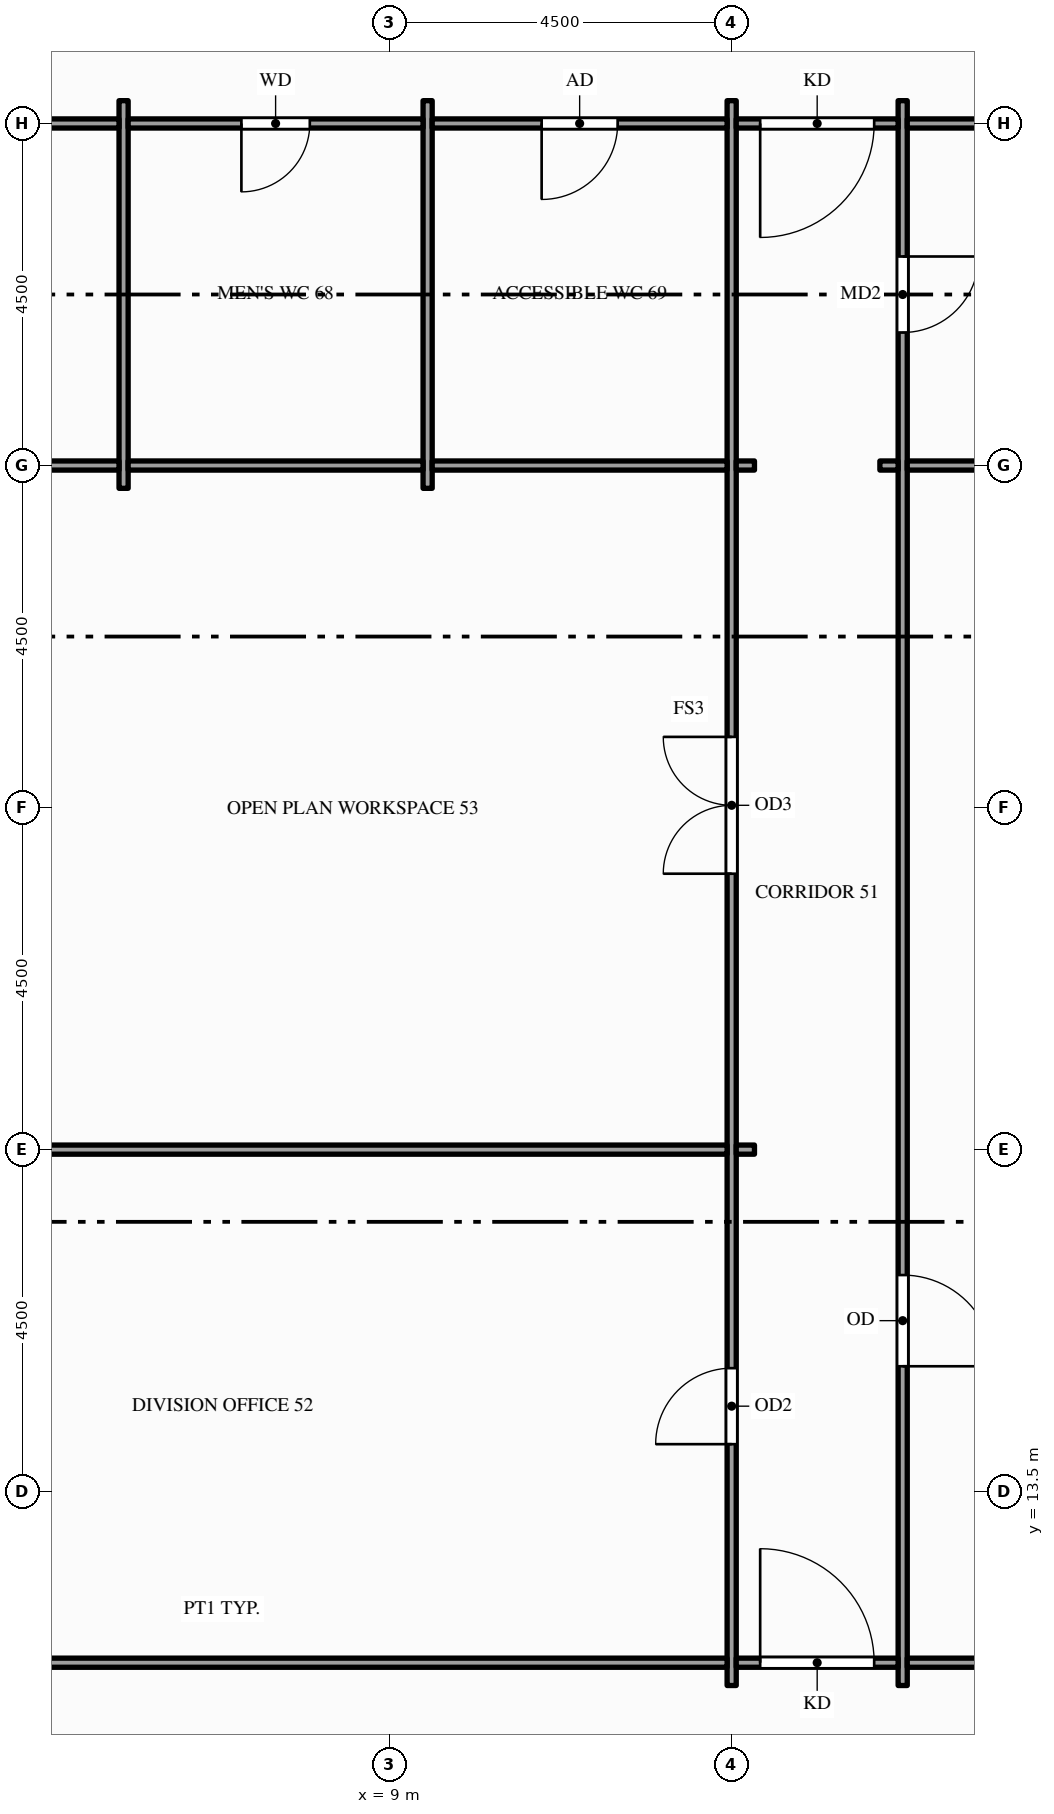
"""IFC4 building model, lengths in metres.
Left out: names, types, materials, properties, quantities, classifications, styles, units other than length and angle.
Written with IfcOpenShell. Run it as: python <this file> out.ifc"""

import sys

from ifc_helpers import new_model, si_unit, direction, frame, frame_2d, origin, place, context, subcontext, project, spatial, rectangle, extrude, element, fill, save


model = new_model("IFC4")
c1 = context("Model", 3, precision=1e-05, world=origin(), true_north=direction((0.0, 1.0)))
c2 = subcontext(c1, "Body", "Model", "MODEL_VIEW")
j1 = project(units=[si_unit("LENGTHUNIT", "METRE"), si_unit("PLANEANGLEUNIT", "RADIAN")], contexts=[c1])
p1 = place(None, origin())
s1 = spatial("IfcSite", under=j1, at=p1, CompositionType="ELEMENT")
p2 = place(p1, origin())
s2 = spatial("IfcBuilding", under=s1, at=p2, CompositionType="ELEMENT")
p3 = place(p2, frame((0.0, 0.0, 119.0)))
s3 = spatial("IfcBuildingStorey", under=s2, at=p3, CompositionType="ELEMENT", Elevation=119.0)
for number, where, z_axis, x_axis in (
    (1, (5.5, 26.7, 0.0), (0.0, 0.0, 1.0), (0.0, 1.0, 0.0)),
    (2, (9.5, 26.7, 0.0), (0.0, 0.0, 1.0), (0.0, 1.0, 0.0)),
):
    element("IfcWall", number, at=place(p3, frame(where, z_axis=z_axis, x_axis=x_axis)), inside=s3, PredefinedType="PARTITIONING", context=c2, shape_type="SweptSolid", body=[
        extrude(rectangle(XDim=5.1, YDim=0.12, at=frame_2d((2.55, 0.0))), origin(), (0.0, 0.0, 1.0), 3.85),
    ])
p4 = place(p3, frame((13.5, 10.95, 0.0), z_axis=(0.0, 0.0, 1.0), x_axis=(0.0, 1.0, 0.0)))
e3 = element("IfcWall", 3, at=p4, inside=s3, PredefinedType="PARTITIONING", context=c2, shape_type="SweptSolid", body=[
    extrude(rectangle(XDim=20.85, YDim=0.12, at=frame_2d((10.425, 0.0))), origin(), (0.0, 0.0, 1.0), 2.6),
])
p5 = place(p4, frame((3.175, 0.0, 0.0)))
e4 = element("IfcOpeningElement", 4, at=p5, cuts=e3, PredefinedType="OPENING", context=c2, shape_type="SweptSolid", body=[
    extrude(rectangle(XDim=1.0, YDim=2.1, at=frame_2d((0.5, 1.05))), frame((0.0, 0.07, 0.0), z_axis=(0.0, -1.0, 0.0), x_axis=(1.0, 0.0, 0.0)), (0.0, 0.0, 1.0), 0.14),
])
p6 = place(p4, frame((10.68, 0.0, 0.0)))
e5 = element("IfcOpeningElement", 5, at=p6, cuts=e3, PredefinedType="OPENING", context=c2, shape_type="SweptSolid", body=[
    extrude(rectangle(XDim=1.8, YDim=2.1, at=frame_2d((0.9, 1.05))), frame((0.0, 0.07, 0.0), z_axis=(0.0, -1.0, 0.0), x_axis=(1.0, 0.0, 0.0)), (0.0, 0.0, 1.0), 0.14),
])
p7 = place(p3, frame((15.75, 10.95, 0.0), z_axis=(0.0, 0.0, 1.0), x_axis=(0.0, 1.0, 0.0)))
e6 = element("IfcWall", 6, at=p7, inside=s3, PredefinedType="PARTITIONING", context=c2, shape_type="SweptSolid", body=[
    extrude(rectangle(XDim=20.85, YDim=0.12, at=frame_2d((10.425, 0.0))), origin(), (0.0, 0.0, 1.0), 2.6),
])
p8 = place(p7, frame((17.8, 0.0, 0.0)))
e7 = element("IfcOpeningElement", 7, at=p8, cuts=e6, PredefinedType="OPENING", context=c2, shape_type="SweptSolid", body=[
    extrude(rectangle(XDim=1.0, YDim=2.1, at=frame_2d((0.5, 1.05))), frame((0.0, 0.07, 0.0), z_axis=(0.0, -1.0, 0.0), x_axis=(1.0, 0.0, 0.0)), (0.0, 0.0, 1.0), 0.14),
])
p9 = place(p7, frame((4.2, 0.0, 0.0)))
e8 = element("IfcOpeningElement", 8, at=p9, cuts=e6, PredefinedType="OPENING", context=c2, shape_type="SweptSolid", body=[
    extrude(rectangle(XDim=1.2, YDim=2.1, at=frame_2d((0.6, 1.05))), frame((0.0, 0.07, 0.0), z_axis=(0.0, -1.0, 0.0), x_axis=(1.0, 0.0, 0.0)), (0.0, 0.0, 1.0), 0.14),
])
p10 = place(p3, frame((0.15, 11.25, 0.0), z_axis=(0.0, 0.0, 1.0), x_axis=(1.0, 0.0, 0.0)))
e9 = element("IfcWall", 9, at=p10, inside=s3, PredefinedType="PARTITIONING", context=c2, shape_type="SweptSolid", body=[
    extrude(rectangle(XDim=13.29, YDim=0.12, at=frame_2d((6.645, 0.0))), origin(), (0.0, 0.0, 1.0), 2.938),
])
p11 = place(p3, frame((13.56, 11.25, 0.0), z_axis=(0.0, 0.0, 1.0), x_axis=(1.0, 0.0, 0.0)))
e10 = element("IfcWall", 10, at=p11, inside=s3, PredefinedType="PARTITIONING", context=c2, shape_type="SweptSolid", body=[
    extrude(rectangle(XDim=2.13, YDim=0.12, at=frame_2d((1.065, 0.0))), origin(), (0.0, 0.0, 1.0), 2.938),
])
p12 = place(p11, frame((0.315, 0.0, 0.0)))
e11 = element("IfcOpeningElement", 11, at=p12, cuts=e10, PredefinedType="OPENING", context=c2, shape_type="SweptSolid", body=[
    extrude(rectangle(XDim=1.5, YDim=2.1, at=frame_2d((0.75, 1.05))), frame((0.0, 0.07, 0.0), z_axis=(0.0, -1.0, 0.0), x_axis=(1.0, 0.0, 0.0)), (0.0, 0.0, 1.0), 0.14),
])
p13 = place(p3, frame((15.81, 11.25, 0.0), z_axis=(0.0, 0.0, 1.0), x_axis=(1.0, 0.0, 0.0)))
e12 = element("IfcWall", 12, at=p13, inside=s3, PredefinedType="PARTITIONING", context=c2, shape_type="SweptSolid", body=[
    extrude(rectangle(XDim=15.63, YDim=0.12, at=frame_2d((7.815, 0.0))), origin(), (0.0, 0.0, 1.0), 2.76),
])
p14 = place(p13, frame((3.54, 0.0, 0.0)))
e13 = element("IfcOpeningElement", 13, at=p14, cuts=e12, PredefinedType="OPENING", context=c2, shape_type="SweptSolid", body=[
    extrude(rectangle(XDim=1.8, YDim=2.1, at=frame_2d((0.9, 1.05))), frame((0.0, 0.07, 0.0), z_axis=(0.0, -1.0, 0.0), x_axis=(1.0, 0.0, 0.0)), (0.0, 0.0, 1.0), 0.14),
])
p15 = place(p3, frame((0.15, 18.0, 0.0), z_axis=(0.0, 0.0, 1.0), x_axis=(1.0, 0.0, 0.0)))
e14 = element("IfcWall", 14, at=p15, inside=s3, PredefinedType="PARTITIONING", context=c2, shape_type="SweptSolid", body=[
    extrude(rectangle(XDim=13.29, YDim=0.12, at=frame_2d((6.645, 0.0))), origin(), (0.0, 0.0, 1.0), 2.938),
])
p16 = place(p3, frame((13.56, 18.0, 0.0), z_axis=(0.0, 0.0, 1.0), x_axis=(1.0, 0.0, 0.0)))
e15 = element("IfcWall", 15, at=p16, inside=s3, PredefinedType="PARTITIONING", context=c2, shape_type="SweptSolid", body=[
    extrude(rectangle(XDim=0.24, YDim=0.12, at=frame_2d((0.12, 0.0))), origin(), (0.0, 0.0, 1.0), 2.938),
])
p17 = place(p3, frame((1.65, 27.0, 0.0), z_axis=(0.0, 0.0, 1.0), x_axis=(1.0, 0.0, 0.0)))
e16 = element("IfcWall", 16, at=p17, inside=s3, PredefinedType="PARTITIONING", context=c2, shape_type="SweptSolid", body=[
    extrude(rectangle(XDim=3.79, YDim=0.12, at=frame_2d((1.895, 0.0))), origin(), (0.0, 0.0, 1.0), 2.938),
])
for number, where, z_axis, x_axis in (
    (17, (5.56, 27.0, 0.0), (0.0, 0.0, 1.0), (1.0, 0.0, 0.0)),
    (18, (9.56, 27.0, 0.0), (0.0, 0.0, 1.0), (1.0, 0.0, 0.0)),
):
    element("IfcWall", number, at=place(p3, frame(where, z_axis=z_axis, x_axis=x_axis)), inside=s3, PredefinedType="PARTITIONING", context=c2, shape_type="SweptSolid", body=[
        extrude(rectangle(XDim=3.88, YDim=0.12, at=frame_2d((1.94, 0.0))), origin(), (0.0, 0.0, 1.0), 2.938),
    ])
for number, where, z_axis, x_axis in (
    (19, (13.56, 27.0, 0.0), (0.0, 0.0, 1.0), (1.0, 0.0, 0.0)),
    (20, (15.45, 27.0, 0.0), (0.0, 0.0, 1.0), (1.0, 0.0, 0.0)),
):
    element("IfcWall", number, at=place(p3, frame(where, z_axis=z_axis, x_axis=x_axis)), inside=s3, PredefinedType="PARTITIONING", context=c2, shape_type="SweptSolid", body=[
        extrude(rectangle(XDim=0.24, YDim=0.12, at=frame_2d((0.12, 0.0))), origin(), (0.0, 0.0, 1.0), 2.938),
    ])
p18 = place(p3, frame((15.81, 27.0, 0.0), z_axis=(0.0, 0.0, 1.0), x_axis=(1.0, 0.0, 0.0)))
e21 = element("IfcWall", 21, at=p18, inside=s3, PredefinedType="PARTITIONING", context=c2, shape_type="SweptSolid", body=[
    extrude(rectangle(XDim=8.04, YDim=0.12, at=frame_2d((4.02, 0.0))), origin(), (0.0, 0.0, 1.0), 2.938),
])
p19 = place(p3, frame((1.65, 31.5, 0.0), z_axis=(0.0, 0.0, 1.0), x_axis=(1.0, 0.0, 0.0)))
e22 = element("IfcWall", 22, at=p19, inside=s3, PredefinedType="PARTITIONING", context=c2, shape_type="SweptSolid", body=[
    extrude(rectangle(XDim=3.79, YDim=0.12, at=frame_2d((1.895, 0.0))), origin(), (0.0, 0.0, 1.0), 2.938),
])
p20 = place(p19, frame((0.85, 0.0, 0.0)))
e23 = element("IfcOpeningElement", 23, at=p20, cuts=e22, PredefinedType="OPENING", context=c2, shape_type="SweptSolid", body=[
    extrude(rectangle(XDim=0.9, YDim=2.1, at=frame_2d((0.45, 1.05))), frame((0.0, 0.07, 0.0), z_axis=(0.0, -1.0, 0.0), x_axis=(1.0, 0.0, 0.0)), (0.0, 0.0, 1.0), 0.14),
])
p21 = place(p3, frame((5.56, 31.5, 0.0), z_axis=(0.0, 0.0, 1.0), x_axis=(1.0, 0.0, 0.0)))
e24 = element("IfcWall", 24, at=p21, inside=s3, PredefinedType="PARTITIONING", context=c2, shape_type="SweptSolid", body=[
    extrude(rectangle(XDim=3.88, YDim=0.12, at=frame_2d((1.94, 0.0))), origin(), (0.0, 0.0, 1.0), 2.938),
])
p22 = place(p21, frame((1.49, 0.0, 0.0)))
e25 = element("IfcOpeningElement", 25, at=p22, cuts=e24, PredefinedType="OPENING", context=c2, shape_type="SweptSolid", body=[
    extrude(rectangle(XDim=0.9, YDim=2.1, at=frame_2d((0.45, 1.05))), frame((0.0, 0.07, 0.0), z_axis=(0.0, -1.0, 0.0), x_axis=(1.0, 0.0, 0.0)), (0.0, 0.0, 1.0), 0.14),
])
p23 = place(p3, frame((9.56, 31.5, 0.0), z_axis=(0.0, 0.0, 1.0), x_axis=(1.0, 0.0, 0.0)))
e26 = element("IfcWall", 26, at=p23, inside=s3, PredefinedType="PARTITIONING", context=c2, shape_type="SweptSolid", body=[
    extrude(rectangle(XDim=3.88, YDim=0.12, at=frame_2d((1.94, 0.0))), origin(), (0.0, 0.0, 1.0), 2.938),
])
p24 = place(p23, frame((1.44, 0.0, 0.0)))
e27 = element("IfcOpeningElement", 27, at=p24, cuts=e26, PredefinedType="OPENING", context=c2, shape_type="SweptSolid", body=[
    extrude(rectangle(XDim=1.0, YDim=2.1, at=frame_2d((0.5, 1.05))), frame((0.0, 0.07, 0.0), z_axis=(0.0, -1.0, 0.0), x_axis=(1.0, 0.0, 0.0)), (0.0, 0.0, 1.0), 0.14),
])
p25 = place(p3, frame((13.56, 31.5, 0.0), z_axis=(0.0, 0.0, 1.0), x_axis=(1.0, 0.0, 0.0)))
e28 = element("IfcWall", 28, at=p25, inside=s3, PredefinedType="PARTITIONING", context=c2, shape_type="SweptSolid", body=[
    extrude(rectangle(XDim=2.13, YDim=0.12, at=frame_2d((1.065, 0.0))), origin(), (0.0, 0.0, 1.0), 2.938),
])
p26 = place(p25, frame((0.315, 0.0, 0.0)))
e29 = element("IfcOpeningElement", 29, at=p26, cuts=e28, PredefinedType="OPENING", context=c2, shape_type="SweptSolid", body=[
    extrude(rectangle(XDim=1.5, YDim=2.1, at=frame_2d((0.75, 1.05))), frame((0.0, 0.07, 0.0), z_axis=(0.0, -1.0, 0.0), x_axis=(1.0, 0.0, 0.0)), (0.0, 0.0, 1.0), 0.14),
])
p27 = place(p3, frame((15.81, 31.5, 0.0), z_axis=(0.0, 0.0, 1.0), x_axis=(1.0, 0.0, 0.0)))
e30 = element("IfcWall", 30, at=p27, inside=s3, PredefinedType="PARTITIONING", context=c2, shape_type="SweptSolid", body=[
    extrude(rectangle(XDim=8.04, YDim=0.12, at=frame_2d((4.02, 0.0))), origin(), (0.0, 0.0, 1.0), 2.938),
])
p28 = place(p12, origin())
e31 = element("IfcDoor", 31, at=p28, inside=s3, OperationType="SINGLE_SWING_LEFT", PredefinedType="DOOR", context=c2, shape_type="SweptSolid", body=[
    extrude(rectangle(XDim=1.5, YDim=2.1, at=frame_2d((0.75, 1.05))), frame((0.0, 0.025, 0.0), z_axis=(0.0, -1.0, 0.0), x_axis=(1.0, 0.0, 0.0)), (0.0, 0.0, 1.0), 0.05),
])
fill(e11, e31)
p29 = place(p26, origin())
e32 = element("IfcDoor", 32, at=p29, inside=s3, OperationType="SINGLE_SWING_LEFT", PredefinedType="DOOR", context=c2, shape_type="SweptSolid", body=[
    extrude(rectangle(XDim=1.5, YDim=2.1, at=frame_2d((0.75, 1.05))), frame((0.0, 0.025, 0.0), z_axis=(0.0, -1.0, 0.0), x_axis=(1.0, 0.0, 0.0)), (0.0, 0.0, 1.0), 0.05),
])
fill(e29, e32)
p30 = place(p5, origin())
e33 = element("IfcDoor", 33, at=p30, inside=s3, OperationType="SINGLE_SWING_LEFT", PredefinedType="DOOR", context=c2, shape_type="SweptSolid", body=[
    extrude(rectangle(XDim=1.0, YDim=2.1, at=frame_2d((0.5, 1.05))), frame((0.0, 0.025, 0.0), z_axis=(0.0, -1.0, 0.0), x_axis=(1.0, 0.0, 0.0)), (0.0, 0.0, 1.0), 0.05),
])
fill(e4, e33)
p31 = place(p6, origin())
e34 = element("IfcDoor", 34, at=p31, inside=s3, OperationType="DOUBLE_DOOR_SINGLE_SWING", PredefinedType="DOOR", context=c2, shape_type="SweptSolid", body=[
    extrude(rectangle(XDim=1.8, YDim=2.1, at=frame_2d((0.9, 1.05))), frame((0.0, 0.025, 0.0), z_axis=(0.0, -1.0, 0.0), x_axis=(1.0, 0.0, 0.0)), (0.0, 0.0, 1.0), 0.05),
])
fill(e5, e34)
p32 = place(p22, origin())
e35 = element("IfcDoor", 35, at=p32, inside=s3, OperationType="SINGLE_SWING_LEFT", PredefinedType="DOOR", context=c2, shape_type="SweptSolid", body=[
    extrude(rectangle(XDim=0.9, YDim=2.1, at=frame_2d((0.45, 1.05))), frame((0.0, 0.025, 0.0), z_axis=(0.0, -1.0, 0.0), x_axis=(1.0, 0.0, 0.0)), (0.0, 0.0, 1.0), 0.05),
])
fill(e25, e35)
p33 = place(p24, origin())
e36 = element("IfcDoor", 36, at=p33, inside=s3, OperationType="SINGLE_SWING_LEFT", PredefinedType="DOOR", context=c2, shape_type="SweptSolid", body=[
    extrude(rectangle(XDim=1.0, YDim=2.1, at=frame_2d((0.5, 1.05))), frame((0.0, 0.025, 0.0), z_axis=(0.0, -1.0, 0.0), x_axis=(1.0, 0.0, 0.0)), (0.0, 0.0, 1.0), 0.05),
])
fill(e27, e36)
p34 = place(p8, origin())
e37 = element("IfcDoor", 37, at=p34, inside=s3, OperationType="SINGLE_SWING_RIGHT", PredefinedType="DOOR", context=c2, shape_type="SweptSolid", body=[
    extrude(rectangle(XDim=1.0, YDim=2.1, at=frame_2d((0.5, 1.05))), frame((0.0, 0.025, 0.0), z_axis=(0.0, -1.0, 0.0), x_axis=(1.0, 0.0, 0.0)), (0.0, 0.0, 1.0), 0.05),
])
fill(e7, e37)
p35 = place(p9, origin())
e38 = element("IfcDoor", 38, at=p35, inside=s3, OperationType="SINGLE_SWING_LEFT", PredefinedType="DOOR", context=c2, shape_type="SweptSolid", body=[
    extrude(rectangle(XDim=1.2, YDim=2.1, at=frame_2d((0.6, 1.05))), frame((0.0, 0.025, 0.0), z_axis=(0.0, -1.0, 0.0), x_axis=(1.0, 0.0, 0.0)), (0.0, 0.0, 1.0), 0.05),
])
fill(e8, e38)
save(model, sys.argv[1])
